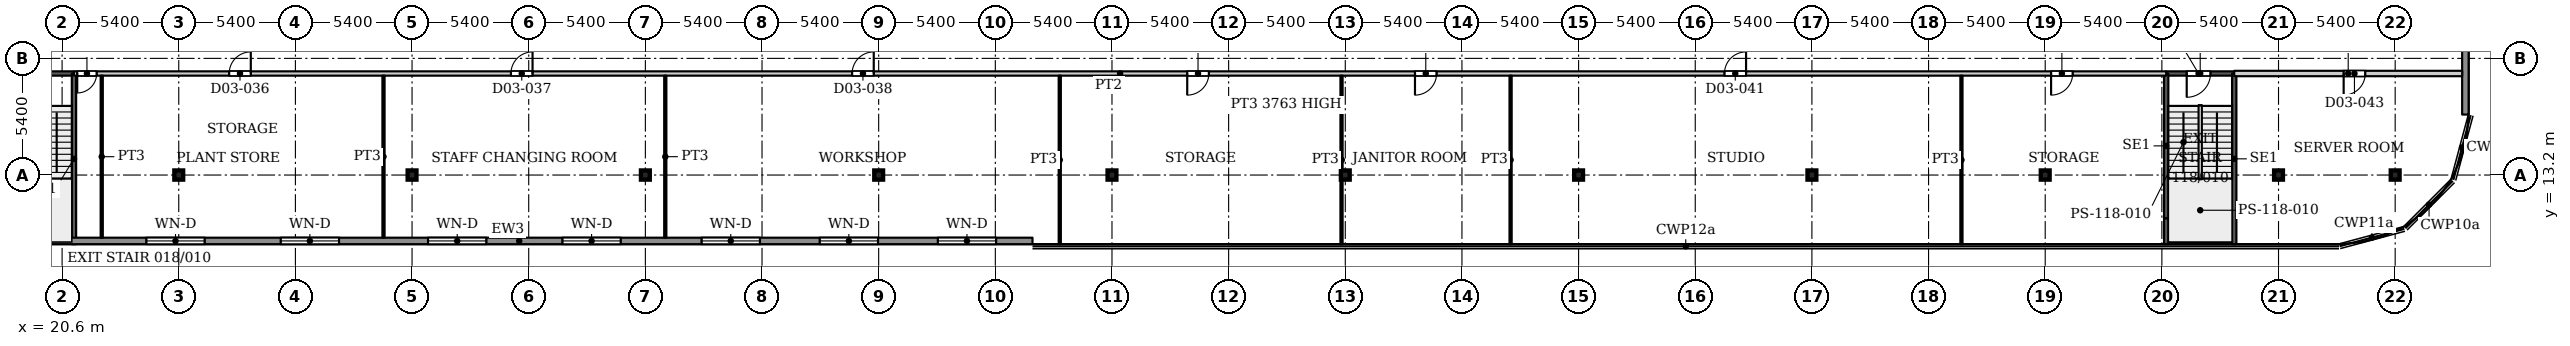
"""IFC4 building model, lengths in metres.
Left out: names, types, materials, properties, quantities, classifications, styles, units other than length and angle.
Written with IfcOpenShell. Run it as: python <this file> out.ifc"""

import sys

from ifc_helpers import new_model, si_unit, direction, frame, frame_2d, origin, origin_2d, place, context, subcontext, project, spatial, rectangle, i_section, extrude, source, transform, mapped, element, fill, save


model = new_model("IFC4")
c1 = context("Model", 3, precision=1e-05, world=origin(), true_north=direction((0.0, 1.0)))
c2 = subcontext(c1, "Body", "Model", "MODEL_VIEW")
j1 = project(units=[si_unit("LENGTHUNIT", "METRE"), si_unit("PLANEANGLEUNIT", "RADIAN")], contexts=[c1])
p1 = place(None, origin())
s1 = spatial("IfcSite", under=j1, at=p1, CompositionType="ELEMENT")
p2 = place(p1, origin())
s2 = spatial("IfcBuilding", under=s1, at=p2, CompositionType="ELEMENT")
p3 = place(p2, frame((0.0, 0.0, 17.0)))
s3 = spatial("IfcBuildingStorey", under=s2, at=p3, CompositionType="ELEMENT", Elevation=17.0)
for number, where, z_axis, x_axis in (
    (1, (26.0, 13.2, 0.0), (0.0, 0.0, 1.0), (1.0, 0.0, 0.0)),
    (2, (36.8, 13.2, 0.0), (0.0, 0.0, 1.0), (1.0, 0.0, 0.0)),
    (3, (47.6, 13.2, 0.0), (0.0, 0.0, 1.0), (1.0, 0.0, 0.0)),
    (4, (58.4, 13.2, 0.0), (0.0, 0.0, 1.0), (1.0, 0.0, 0.0)),
    (5, (69.2, 13.2, 0.0), (0.0, 0.0, 1.0), (1.0, 0.0, 0.0)),
    (6, (80.0, 13.2, 0.0), (0.0, 0.0, 1.0), (1.0, 0.0, 0.0)),
    (7, (90.8, 13.2, 0.0), (0.0, 0.0, 1.0), (1.0, 0.0, 0.0)),
    (8, (101.6, 13.2, 0.0), (0.0, 0.0, 1.0), (1.0, 0.0, 0.0)),
    (9, (112.4, 13.2, 0.0), (0.0, 0.0, 1.0), (1.0, 0.0, 0.0)),
    (10, (123.2, 13.2, 0.0), (0.0, 0.0, 1.0), (1.0, 0.0, 0.0)),
    (11, (128.6, 13.2, 0.0), (0.0, 0.0, 1.0), (1.0, 0.0, 0.0)),
):
    element("IfcColumn", number, at=place(p3, frame(where, z_axis=z_axis, x_axis=x_axis)), inside=s3, PredefinedType="COLUMN", context=c2, shape_type="SweptSolid", body=[
        extrude(i_section(OverallWidth=0.409, OverallDepth=0.425, WebThickness=0.033, FlangeThickness=0.052, FilletRadius=0.013, at=origin_2d()), origin(), (0.0, 0.0, 1.0), 4.5),
    ])
p4 = place(p3, frame((131.85, 54.72, 0.0), z_axis=(0.0, 0.0, 1.0), x_axis=(0.0, -1.0, 0.0)))
e12 = element("IfcWall", 12, at=p4, inside=s3, PredefinedType="SOLIDWALL", context=c2, shape_type="SweptSolid", body=[
    extrude(rectangle(XDim=38.72, YDim=0.3, at=frame_2d((19.36, 0.0))), origin(), (0.0, 0.0, 1.0), 4.25),
])
p5 = place(p4, frame((2.435, 0.0, 0.9)))
e13 = element("IfcOpeningElement", 13, at=p5, cuts=e12, PredefinedType="OPENING", context=c2, shape_type="SweptSolid", body=[
    extrude(rectangle(XDim=2.7, YDim=2.1, at=frame_2d((1.35, 1.05))), frame((0.0, 0.16, 0.0), z_axis=(0.0, -1.0, 0.0), x_axis=(1.0, 0.0, 0.0)), (0.0, 0.0, 1.0), 0.32),
])
p6 = place(p4, frame((13.58, 0.0, 0.9)))
e14 = element("IfcOpeningElement", 14, at=p6, cuts=e12, PredefinedType="OPENING", context=c2, shape_type="SweptSolid", body=[
    extrude(rectangle(XDim=2.7, YDim=2.1, at=frame_2d((1.35, 1.05))), frame((0.0, 0.16, 0.0), z_axis=(0.0, -1.0, 0.0), x_axis=(1.0, 0.0, 0.0)), (0.0, 0.0, 1.0), 0.32),
])
p7 = place(p4, frame((26.16, 0.0, 0.9)))
e15 = element("IfcOpeningElement", 15, at=p7, cuts=e12, PredefinedType="OPENING", context=c2, shape_type="SweptSolid", body=[
    extrude(rectangle(XDim=2.7, YDim=2.1, at=frame_2d((1.35, 1.05))), frame((0.0, 0.16, 0.0), z_axis=(0.0, -1.0, 0.0), x_axis=(1.0, 0.0, 0.0)), (0.0, 0.0, 1.0), 0.32),
])
p8 = place(p3, frame((65.52, 10.15, 0.0), z_axis=(0.0, 0.0, 1.0), x_axis=(-1.0, 0.0, 0.0)))
e16 = element("IfcWall", 16, at=p8, inside=s3, PredefinedType="SOLIDWALL", context=c2, shape_type="SweptSolid", body=[
    extrude(rectangle(XDim=47.52, YDim=0.3, at=frame_2d((23.76, 0.0))), origin(), (0.0, 0.0, 1.0), 4.25),
])
p9 = place(p8, frame((1.683, 0.0, 0.9)))
e17 = element("IfcOpeningElement", 17, at=p9, cuts=e16, PredefinedType="OPENING", context=c2, shape_type="SweptSolid", body=[
    extrude(rectangle(XDim=2.7, YDim=2.1, at=frame_2d((1.35, 1.05))), frame((0.0, 0.16, 0.0), z_axis=(0.0, -1.0, 0.0), x_axis=(1.0, 0.0, 0.0)), (0.0, 0.0, 1.0), 0.32),
])
p10 = place(p8, frame((7.15, 0.0, 0.9)))
e18 = element("IfcOpeningElement", 18, at=p10, cuts=e16, PredefinedType="OPENING", context=c2, shape_type="SweptSolid", body=[
    extrude(rectangle(XDim=2.7, YDim=2.1, at=frame_2d((1.35, 1.05))), frame((0.0, 0.16, 0.0), z_axis=(0.0, -1.0, 0.0), x_axis=(1.0, 0.0, 0.0)), (0.0, 0.0, 1.0), 0.32),
])
p11 = place(p8, frame((12.617, 0.0, 0.9)))
e19 = element("IfcOpeningElement", 19, at=p11, cuts=e16, PredefinedType="OPENING", context=c2, shape_type="SweptSolid", body=[
    extrude(rectangle(XDim=2.7, YDim=2.1, at=frame_2d((1.35, 1.05))), frame((0.0, 0.16, 0.0), z_axis=(0.0, -1.0, 0.0), x_axis=(1.0, 0.0, 0.0)), (0.0, 0.0, 1.0), 0.32),
])
p12 = place(p8, frame((19.06, 0.0, 0.9)))
e20 = element("IfcOpeningElement", 20, at=p12, cuts=e16, PredefinedType="OPENING", context=c2, shape_type="SweptSolid", body=[
    extrude(rectangle(XDim=2.7, YDim=2.1, at=frame_2d((1.35, 1.05))), frame((0.0, 0.16, 0.0), z_axis=(0.0, -1.0, 0.0), x_axis=(1.0, 0.0, 0.0)), (0.0, 0.0, 1.0), 0.32),
])
p13 = place(p8, frame((25.28, 0.0, 0.9)))
e21 = element("IfcOpeningElement", 21, at=p13, cuts=e16, PredefinedType="OPENING", context=c2, shape_type="SweptSolid", body=[
    extrude(rectangle(XDim=2.7, YDim=2.1, at=frame_2d((1.35, 1.05))), frame((0.0, 0.16, 0.0), z_axis=(0.0, -1.0, 0.0), x_axis=(1.0, 0.0, 0.0)), (0.0, 0.0, 1.0), 0.32),
])
p14 = place(p8, frame((32.1, 0.0, 0.9)))
e22 = element("IfcOpeningElement", 22, at=p14, cuts=e16, PredefinedType="OPENING", context=c2, shape_type="SweptSolid", body=[
    extrude(rectangle(XDim=2.7, YDim=2.1, at=frame_2d((1.35, 1.05))), frame((0.0, 0.16, 0.0), z_axis=(0.0, -1.0, 0.0), x_axis=(1.0, 0.0, 0.0)), (0.0, 0.0, 1.0), 0.32),
])
p15 = place(p8, frame((38.32, 0.0, 0.9)))
e23 = element("IfcOpeningElement", 23, at=p15, cuts=e16, PredefinedType="OPENING", context=c2, shape_type="SweptSolid", body=[
    extrude(rectangle(XDim=2.7, YDim=2.1, at=frame_2d((1.35, 1.05))), frame((0.0, 0.16, 0.0), z_axis=(0.0, -1.0, 0.0), x_axis=(1.0, 0.0, 0.0)), (0.0, 0.0, 1.0), 0.32),
])
p16 = place(p3, frame((18.0, 17.9, 0.0), z_axis=(0.0, 0.0, 1.0), x_axis=(1.0, 0.0, 0.0)))
e24 = element("IfcWall", 24, at=p16, inside=s3, PredefinedType="SHEAR", context=c2, shape_type="SweptSolid", body=[
    extrude(rectangle(XDim=3.15, YDim=0.2, at=frame_2d((1.575, 0.0))), origin(), (0.0, 0.0, 1.0), 4.5),
])
p17 = place(p16, frame((0.95, 0.0, 0.0)))
e25 = element("IfcOpeningElement", 25, at=p17, cuts=e24, PredefinedType="OPENING", context=c2, shape_type="SweptSolid", body=[
    extrude(rectangle(XDim=1.1, YDim=2.2, at=frame_2d((0.55, 1.1))), frame((0.0, 0.11, 0.0), z_axis=(0.0, -1.0, 0.0), x_axis=(1.0, 0.0, 0.0)), (0.0, 0.0, 1.0), 0.22),
])
p18 = place(p3, frame((21.15, 10.0, 0.0), z_axis=(0.0, 0.0, 1.0), x_axis=(0.0, 1.0, 0.0)))
e26 = element("IfcWall", 26, at=p18, inside=s3, PredefinedType="SHEAR", context=c2, shape_type="SweptSolid", body=[
    extrude(rectangle(XDim=7.9, YDim=0.2, at=frame_2d((3.95, 0.0))), origin(), (0.0, 0.0, 1.0), 4.5),
])
p19 = place(p3, frame((118.0, 17.9, 0.0), z_axis=(0.0, 0.0, 1.0), x_axis=(1.0, 0.0, 0.0)))
e27 = element("IfcWall", 27, at=p19, inside=s3, PredefinedType="SHEAR", context=c2, shape_type="SweptSolid", body=[
    extrude(rectangle(XDim=3.15, YDim=0.2, at=frame_2d((1.575, 0.0))), origin(), (0.0, 0.0, 1.0), 4.5),
])
p20 = place(p19, frame((0.95, 0.0, 0.0)))
e28 = element("IfcOpeningElement", 28, at=p20, cuts=e27, PredefinedType="OPENING", context=c2, shape_type="SweptSolid", body=[
    extrude(rectangle(XDim=1.1, YDim=2.2, at=frame_2d((0.55, 1.1))), frame((0.0, 0.11, 0.0), z_axis=(0.0, -1.0, 0.0), x_axis=(1.0, 0.0, 0.0)), (0.0, 0.0, 1.0), 0.22),
])
p21 = place(p3, frame((118.0, 10.0, 0.0), z_axis=(0.0, 0.0, 1.0), x_axis=(0.0, 1.0, 0.0)))
e29 = element("IfcWall", 29, at=p21, inside=s3, PredefinedType="SHEAR", context=c2, shape_type="SweptSolid", body=[
    extrude(rectangle(XDim=1.2, YDim=0.2, at=frame_2d((0.6, 0.0))), origin(), (0.0, 0.0, 1.0), 4.5),
])
p22 = place(p3, frame((118.0, 11.2, 0.0), z_axis=(0.0, 0.0, 1.0), x_axis=(0.0, 1.0, 0.0)))
e30 = element("IfcWall", 30, at=p22, inside=s3, PredefinedType="SHEAR", context=c2, shape_type="SweptSolid", body=[
    extrude(rectangle(XDim=6.7, YDim=0.2, at=frame_2d((3.35, 0.0))), origin(), (0.0, 0.0, 1.0), 4.5),
])
p23 = place(p3, frame((121.15, 10.0, 0.0), z_axis=(0.0, 0.0, 1.0), x_axis=(0.0, 1.0, 0.0)))
e31 = element("IfcWall", 31, at=p23, inside=s3, PredefinedType="SHEAR", context=c2, shape_type="SweptSolid", body=[
    extrude(rectangle(XDim=7.9, YDim=0.2, at=frame_2d((3.95, 0.0))), origin(), (0.0, 0.0, 1.0), 4.5),
])
p24 = place(p3, frame((21.15, 17.9, 0.0), z_axis=(0.0, 0.0, 1.0), x_axis=(1.0, 0.0, 0.0)))
e32 = element("IfcWall", 32, at=p24, inside=s3, PredefinedType="PARTITIONING", context=c2, shape_type="SweptSolid", body=[
    extrude(rectangle(XDim=96.85, YDim=0.2, at=frame_2d((48.425, 0.0))), origin(), (0.0, 0.0, 1.0), 4.18),
])
p25 = place(p24, frame((0.15, 0.0, 0.0)))
e33 = element("IfcOpeningElement", 33, at=p25, cuts=e32, PredefinedType="OPENING", context=c2, shape_type="SweptSolid", body=[
    extrude(rectangle(XDim=0.9, YDim=2.1, at=frame_2d((0.45, 1.05))), frame((0.0, 0.11, 0.0), z_axis=(0.0, -1.0, 0.0), x_axis=(1.0, 0.0, 0.0)), (0.0, 0.0, 1.0), 0.22),
])
p26 = place(p24, frame((7.185, 0.0, 0.0)))
e34 = element("IfcOpeningElement", 34, at=p26, cuts=e32, PredefinedType="OPENING", context=c2, shape_type="SweptSolid", body=[
    extrude(rectangle(XDim=1.0, YDim=2.1, at=frame_2d((0.5, 1.05))), frame((0.0, 0.11, 0.0), z_axis=(0.0, -1.0, 0.0), x_axis=(1.0, 0.0, 0.0)), (0.0, 0.0, 1.0), 0.22),
])
p27 = place(p24, frame((20.228, 0.0, 0.0)))
e35 = element("IfcOpeningElement", 35, at=p27, cuts=e32, PredefinedType="OPENING", context=c2, shape_type="SweptSolid", body=[
    extrude(rectangle(XDim=1.0, YDim=2.1, at=frame_2d((0.5, 1.05))), frame((0.0, 0.11, 0.0), z_axis=(0.0, -1.0, 0.0), x_axis=(1.0, 0.0, 0.0)), (0.0, 0.0, 1.0), 0.22),
])
p28 = place(p24, frame((36.022, 0.0, 0.0)))
e36 = element("IfcOpeningElement", 36, at=p28, cuts=e32, PredefinedType="OPENING", context=c2, shape_type="SweptSolid", body=[
    extrude(rectangle(XDim=1.0, YDim=2.1, at=frame_2d((0.5, 1.05))), frame((0.0, 0.11, 0.0), z_axis=(0.0, -1.0, 0.0), x_axis=(1.0, 0.0, 0.0)), (0.0, 0.0, 1.0), 0.22),
])
p29 = place(p24, frame((51.533, 0.0, 0.0)))
e37 = element("IfcOpeningElement", 37, at=p29, cuts=e32, PredefinedType="OPENING", context=c2, shape_type="SweptSolid", body=[
    extrude(rectangle(XDim=1.0, YDim=2.1, at=frame_2d((0.5, 1.05))), frame((0.0, 0.11, 0.0), z_axis=(0.0, -1.0, 0.0), x_axis=(1.0, 0.0, 0.0)), (0.0, 0.0, 1.0), 0.22),
])
p30 = place(p24, frame((62.076, 0.0, 0.0)))
e38 = element("IfcOpeningElement", 38, at=p30, cuts=e32, PredefinedType="OPENING", context=c2, shape_type="SweptSolid", body=[
    extrude(rectangle(XDim=1.0, YDim=2.1, at=frame_2d((0.5, 1.05))), frame((0.0, 0.11, 0.0), z_axis=(0.0, -1.0, 0.0), x_axis=(1.0, 0.0, 0.0)), (0.0, 0.0, 1.0), 0.22),
])
p31 = place(p24, frame((76.402, 0.0, 0.0)))
e39 = element("IfcOpeningElement", 39, at=p31, cuts=e32, PredefinedType="OPENING", context=c2, shape_type="SweptSolid", body=[
    extrude(rectangle(XDim=1.0, YDim=2.1, at=frame_2d((0.5, 1.05))), frame((0.0, 0.11, 0.0), z_axis=(0.0, -1.0, 0.0), x_axis=(1.0, 0.0, 0.0)), (0.0, 0.0, 1.0), 0.22),
])
p32 = place(p24, frame((91.522, 0.0, 0.0)))
e40 = element("IfcOpeningElement", 40, at=p32, cuts=e32, PredefinedType="OPENING", context=c2, shape_type="SweptSolid", body=[
    extrude(rectangle(XDim=1.0, YDim=2.1, at=frame_2d((0.5, 1.05))), frame((0.0, 0.11, 0.0), z_axis=(0.0, -1.0, 0.0), x_axis=(1.0, 0.0, 0.0)), (0.0, 0.0, 1.0), 0.22),
])
for number, where, z_axis, x_axis in (
    (41, (22.435, 10.299, 0.0), (0.0, 0.0, 1.0), (0.0, 1.0, 0.0)),
    (42, (35.478, 10.299, 0.0), (0.0, 0.0, 1.0), (0.0, 1.0, 0.0)),
    (43, (48.522, 10.299, 0.0), (0.0, 0.0, 1.0), (0.0, 1.0, 0.0)),
):
    element("IfcWall", number, at=place(p3, frame(where, z_axis=z_axis, x_axis=x_axis)), inside=s3, PredefinedType="PARTITIONING", context=c2, shape_type="SweptSolid", body=[
        extrude(rectangle(XDim=7.501, YDim=0.1, at=frame_2d((3.75, 0.0))), origin(), (0.0, 0.0, 1.0), 4.18),
    ])
p33 = place(p3, frame((66.783, 10.0, 0.0), z_axis=(0.0, 0.0, 1.0), x_axis=(0.0, 1.0, 0.0)))
e44 = element("IfcWall", 44, at=p33, inside=s3, PredefinedType="PARTITIONING", context=c2, shape_type="SweptSolid", body=[
    extrude(rectangle(XDim=7.8, YDim=0.1, at=frame_2d((3.9, 0.0))), origin(), (0.0, 0.0, 1.0), 4.18),
])
p34 = place(p3, frame((79.826, 10.0, 0.0), z_axis=(0.0, 0.0, 1.0), x_axis=(0.0, 1.0, 0.0)))
e45 = element("IfcWall", 45, at=p34, inside=s3, PredefinedType="PARTITIONING", context=c2, shape_type="SweptSolid", body=[
    extrude(rectangle(XDim=7.8, YDim=0.1, at=frame_2d((3.9, 0.0))), origin(), (0.0, 0.0, 1.0), 3.763),
])
for number, where, z_axis, x_axis in (
    (46, (87.652, 10.0, 0.0), (0.0, 0.0, 1.0), (0.0, 1.0, 0.0)),
    (47, (108.522, 10.0, 0.0), (0.0, 0.0, 1.0), (0.0, 1.0, 0.0)),
):
    element("IfcWall", number, at=place(p3, frame(where, z_axis=z_axis, x_axis=x_axis)), inside=s3, PredefinedType="PARTITIONING", context=c2, shape_type="SweptSolid", body=[
        extrude(rectangle(XDim=7.8, YDim=0.1, at=frame_2d((3.9, 0.0))), origin(), (0.0, 0.0, 1.0), 4.18),
    ])
p35 = place(p3, frame((121.15, 17.9, 0.0), z_axis=(0.0, 0.0, 1.0), x_axis=(1.0, 0.0, 0.0)))
e48 = element("IfcWall", 48, at=p35, inside=s3, PredefinedType="PARTITIONING", context=c2, shape_type="SweptSolid", body=[
    extrude(rectangle(XDim=10.551, YDim=0.25, at=frame_2d((5.275, 0.0))), origin(), (0.0, 0.0, 1.0), 4.18),
])
p36 = place(p35, frame((5.065, 0.0, 0.0)))
e49 = element("IfcOpeningElement", 49, at=p36, cuts=e48, PredefinedType="OPENING", context=c2, shape_type="SweptSolid", body=[
    extrude(rectangle(XDim=1.0, YDim=2.1, at=frame_2d((0.5, 1.05))), frame((0.0, 0.135, 0.0), z_axis=(0.0, -1.0, 0.0), x_axis=(1.0, 0.0, 0.0)), (0.0, 0.0, 1.0), 0.27),
])
m1 = source(origin(), c2, "Body", "SweptSolid", [
    extrude(rectangle(XDim=2.7, YDim=2.1, at=frame_2d((1.35, 1.05))), frame((0.0, 0.03, 0.0), z_axis=(0.0, -1.0, 0.0), x_axis=(1.0, 0.0, 0.0)), (0.0, 0.0, 1.0), 0.06),
])
p37 = place(p9, origin())
e50 = element("IfcWindow", 50, at=p37, inside=s3, PartitioningType="SINGLE_PANEL", PredefinedType="WINDOW", context=c2, shape_type="MappedRepresentation", body=[
    mapped(m1, transform((0.0, 0.0, 0.0), x_axis=(1.0, 0.0, 0.0), y_axis=(0.0, 1.0, 0.0), z_axis=(0.0, 0.0, 1.0), scale=1.0)),
])
fill(e17, e50)
p38 = place(p10, origin())
e51 = element("IfcWindow", 51, at=p38, inside=s3, PartitioningType="SINGLE_PANEL", PredefinedType="WINDOW", context=c2, shape_type="MappedRepresentation", body=[
    mapped(m1, transform((0.0, 0.0, 0.0), x_axis=(1.0, 0.0, 0.0), y_axis=(0.0, 1.0, 0.0), z_axis=(0.0, 0.0, 1.0), scale=1.0)),
])
fill(e18, e51)
p39 = place(p11, origin())
e52 = element("IfcWindow", 52, at=p39, inside=s3, PartitioningType="SINGLE_PANEL", PredefinedType="WINDOW", context=c2, shape_type="MappedRepresentation", body=[
    mapped(m1, transform((0.0, 0.0, 0.0), x_axis=(1.0, 0.0, 0.0), y_axis=(0.0, 1.0, 0.0), z_axis=(0.0, 0.0, 1.0), scale=1.0)),
])
fill(e19, e52)
p40 = place(p12, origin())
e53 = element("IfcWindow", 53, at=p40, inside=s3, PartitioningType="SINGLE_PANEL", PredefinedType="WINDOW", context=c2, shape_type="MappedRepresentation", body=[
    mapped(m1, transform((0.0, 0.0, 0.0), x_axis=(1.0, 0.0, 0.0), y_axis=(0.0, 1.0, 0.0), z_axis=(0.0, 0.0, 1.0), scale=1.0)),
])
fill(e20, e53)
p41 = place(p13, origin())
e54 = element("IfcWindow", 54, at=p41, inside=s3, PartitioningType="SINGLE_PANEL", PredefinedType="WINDOW", context=c2, shape_type="MappedRepresentation", body=[
    mapped(m1, transform((0.0, 0.0, 0.0), x_axis=(1.0, 0.0, 0.0), y_axis=(0.0, 1.0, 0.0), z_axis=(0.0, 0.0, 1.0), scale=1.0)),
])
fill(e21, e54)
p42 = place(p14, origin())
e55 = element("IfcWindow", 55, at=p42, inside=s3, PartitioningType="SINGLE_PANEL", PredefinedType="WINDOW", context=c2, shape_type="MappedRepresentation", body=[
    mapped(m1, transform((0.0, 0.0, 0.0), x_axis=(1.0, 0.0, 0.0), y_axis=(0.0, 1.0, 0.0), z_axis=(0.0, 0.0, 1.0), scale=1.0)),
])
fill(e22, e55)
p43 = place(p15, origin())
e56 = element("IfcWindow", 56, at=p43, inside=s3, PartitioningType="SINGLE_PANEL", PredefinedType="WINDOW", context=c2, shape_type="MappedRepresentation", body=[
    mapped(m1, transform((0.0, 0.0, 0.0), x_axis=(1.0, 0.0, 0.0), y_axis=(0.0, 1.0, 0.0), z_axis=(0.0, 0.0, 1.0), scale=1.0)),
])
fill(e23, e56)
m2 = source(origin(), c2, "Body", "SweptSolid", [
    extrude(rectangle(XDim=1.1, YDim=2.2, at=frame_2d((0.55, 1.1))), frame((0.0, 0.025, 0.0), z_axis=(0.0, -1.0, 0.0), x_axis=(1.0, 0.0, 0.0)), (0.0, 0.0, 1.0), 0.05),
])
p44 = place(p20, origin())
e57 = element("IfcDoor", 57, at=p44, inside=s3, OperationType="SINGLE_SWING_RIGHT", PredefinedType="DOOR", context=c2, shape_type="MappedRepresentation", body=[
    mapped(m2, transform((0.0, 0.0, 0.0), x_axis=(1.0, 0.0, 0.0), y_axis=(0.0, 1.0, 0.0), z_axis=(0.0, 0.0, 1.0), scale=1.0)),
])
fill(e28, e57)
m3 = source(origin(), c2, "Body", "SweptSolid", [
    extrude(rectangle(XDim=0.9, YDim=2.1, at=frame_2d((0.45, 1.05))), frame((0.0, 0.025, 0.0), z_axis=(0.0, -1.0, 0.0), x_axis=(1.0, 0.0, 0.0)), (0.0, 0.0, 1.0), 0.05),
])
p45 = place(p25, origin())
e58 = element("IfcDoor", 58, at=p45, inside=s3, OperationType="SINGLE_SWING_RIGHT", PredefinedType="DOOR", context=c2, shape_type="MappedRepresentation", body=[
    mapped(m3, transform((0.0, 0.0, 0.0), x_axis=(1.0, 0.0, 0.0), y_axis=(0.0, 1.0, 0.0), z_axis=(0.0, 0.0, 1.0), scale=1.0)),
])
fill(e33, e58)
m4 = source(origin(), c2, "Body", "SweptSolid", [
    extrude(rectangle(XDim=1.0, YDim=2.1, at=frame_2d((0.5, 1.05))), frame((0.0, 0.025, 0.0), z_axis=(0.0, -1.0, 0.0), x_axis=(1.0, 0.0, 0.0)), (0.0, 0.0, 1.0), 0.05),
])
p46 = place(p26, origin())
e59 = element("IfcDoor", 59, at=p46, inside=s3, OperationType="SINGLE_SWING_LEFT", PredefinedType="DOOR", context=c2, shape_type="MappedRepresentation", body=[
    mapped(m4, transform((0.0, 0.0, 0.0), x_axis=(1.0, 0.0, 0.0), y_axis=(0.0, 1.0, 0.0), z_axis=(0.0, 0.0, 1.0), scale=1.0)),
])
fill(e34, e59)
p47 = place(p27, origin())
e60 = element("IfcDoor", 60, at=p47, inside=s3, OperationType="SINGLE_SWING_LEFT", PredefinedType="DOOR", context=c2, shape_type="MappedRepresentation", body=[
    mapped(m4, transform((0.0, 0.0, 0.0), x_axis=(1.0, 0.0, 0.0), y_axis=(0.0, 1.0, 0.0), z_axis=(0.0, 0.0, 1.0), scale=1.0)),
])
fill(e35, e60)
p48 = place(p28, origin())
e61 = element("IfcDoor", 61, at=p48, inside=s3, OperationType="SINGLE_SWING_LEFT", PredefinedType="DOOR", context=c2, shape_type="MappedRepresentation", body=[
    mapped(m4, transform((0.0, 0.0, 0.0), x_axis=(1.0, 0.0, 0.0), y_axis=(0.0, 1.0, 0.0), z_axis=(0.0, 0.0, 1.0), scale=1.0)),
])
fill(e36, e61)
p49 = place(p29, origin())
e62 = element("IfcDoor", 62, at=p49, inside=s3, OperationType="SINGLE_SWING_RIGHT", PredefinedType="DOOR", context=c2, shape_type="MappedRepresentation", body=[
    mapped(m4, transform((0.0, 0.0, 0.0), x_axis=(1.0, 0.0, 0.0), y_axis=(0.0, 1.0, 0.0), z_axis=(0.0, 0.0, 1.0), scale=1.0)),
])
fill(e37, e62)
p50 = place(p30, origin())
e63 = element("IfcDoor", 63, at=p50, inside=s3, OperationType="SINGLE_SWING_RIGHT", PredefinedType="DOOR", context=c2, shape_type="MappedRepresentation", body=[
    mapped(m4, transform((0.0, 0.0, 0.0), x_axis=(1.0, 0.0, 0.0), y_axis=(0.0, 1.0, 0.0), z_axis=(0.0, 0.0, 1.0), scale=1.0)),
])
fill(e38, e63)
p51 = place(p31, origin())
e64 = element("IfcDoor", 64, at=p51, inside=s3, OperationType="SINGLE_SWING_LEFT", PredefinedType="DOOR", context=c2, shape_type="MappedRepresentation", body=[
    mapped(m4, transform((0.0, 0.0, 0.0), x_axis=(1.0, 0.0, 0.0), y_axis=(0.0, 1.0, 0.0), z_axis=(0.0, 0.0, 1.0), scale=1.0)),
])
fill(e39, e64)
p52 = place(p32, origin())
e65 = element("IfcDoor", 65, at=p52, inside=s3, OperationType="SINGLE_SWING_RIGHT", PredefinedType="DOOR", context=c2, shape_type="MappedRepresentation", body=[
    mapped(m4, transform((0.0, 0.0, 0.0), x_axis=(1.0, 0.0, 0.0), y_axis=(0.0, 1.0, 0.0), z_axis=(0.0, 0.0, 1.0), scale=1.0)),
])
fill(e40, e65)
m5 = source(origin(), c2, "Body", "SweptSolid", [
    extrude(rectangle(XDim=1.0, YDim=2.1, at=frame_2d((0.5, 1.05))), frame((0.0, 0.025, 0.0), z_axis=(0.0, -1.0, 0.0), x_axis=(1.0, 0.0, 0.0)), (0.0, 0.0, 1.0), 0.05),
])
p53 = place(p36, origin())
e66 = element("IfcDoor", 66, at=p53, inside=s3, OperationType="SINGLE_SWING_RIGHT", PredefinedType="DOOR", context=c2, shape_type="MappedRepresentation", body=[
    mapped(m5, transform((0.0, 0.0, 0.0), x_axis=(1.0, 0.0, 0.0), y_axis=(0.0, 1.0, 0.0), z_axis=(0.0, 0.0, 1.0), scale=1.0)),
])
fill(e49, e66)
save(model, sys.argv[1])
